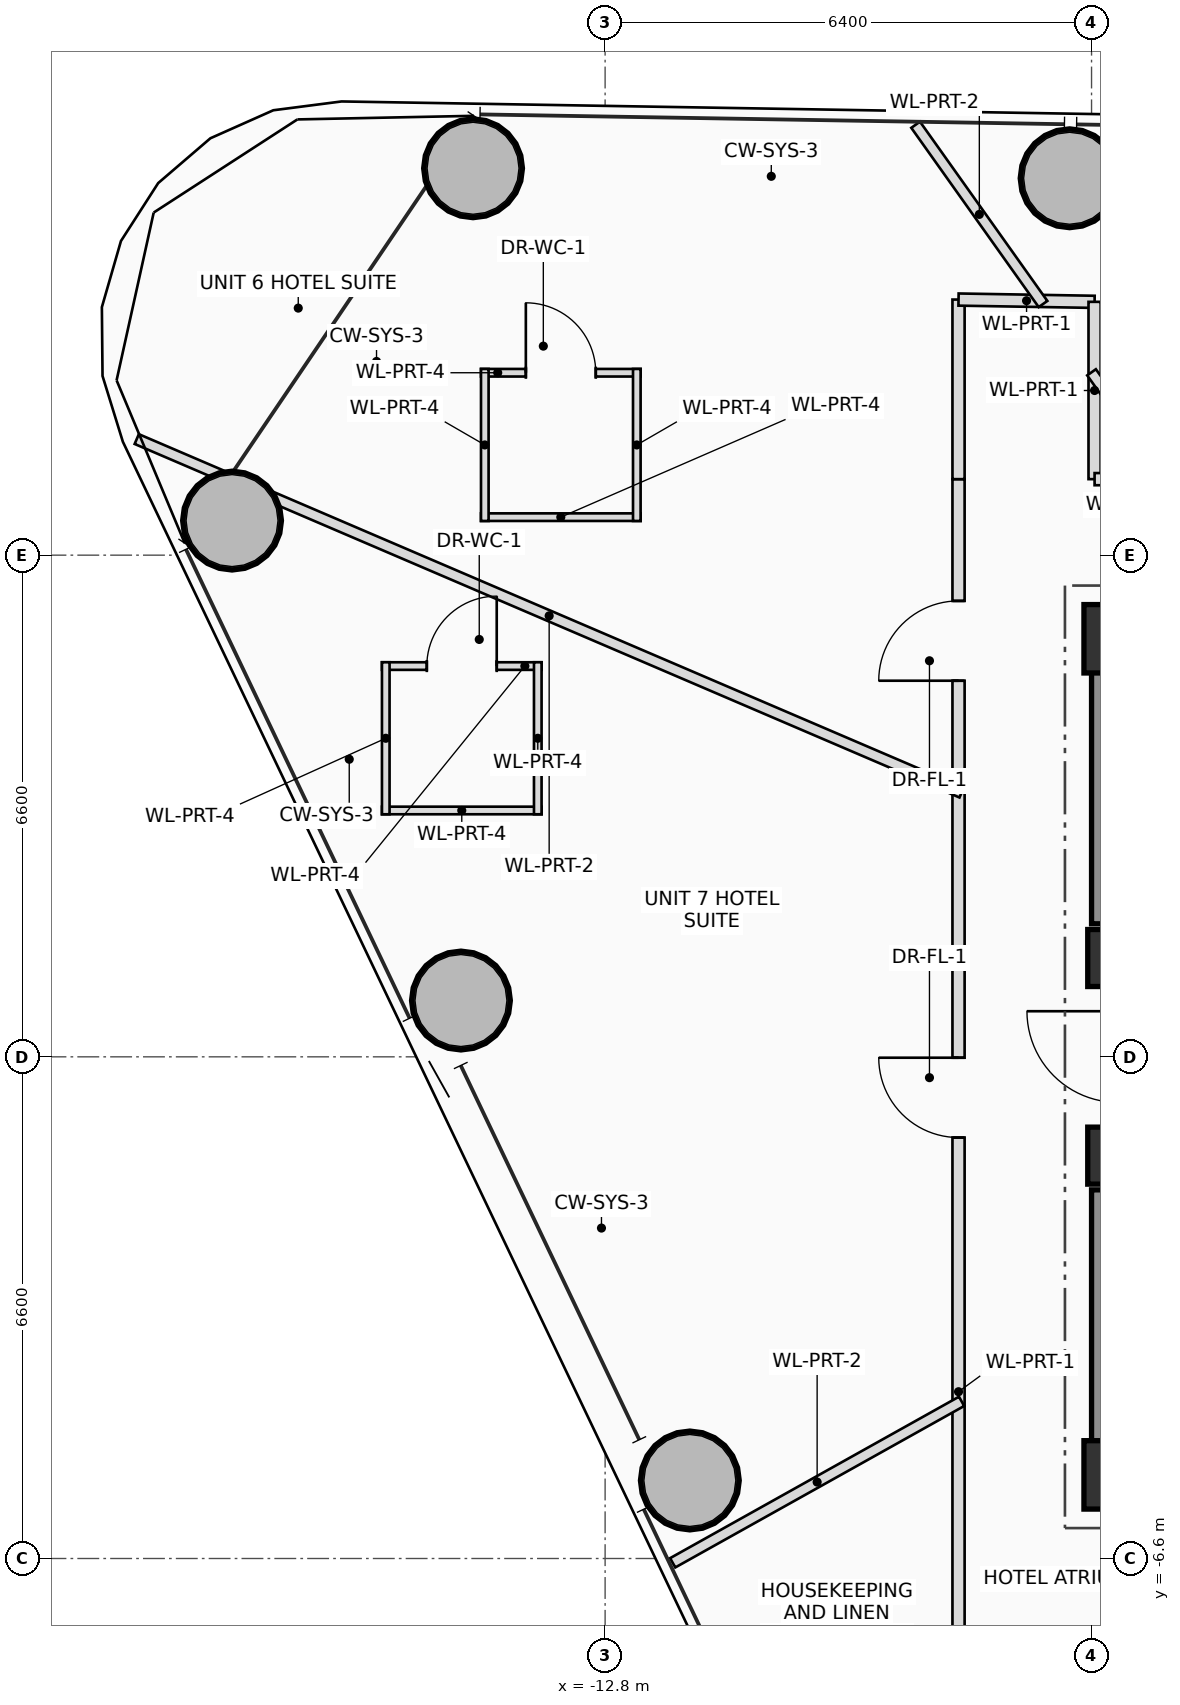
"""IFC4 building model, lengths in metres.
Left out: names, types, materials, properties, quantities, classifications, styles, units other than length and angle.
Written with IfcOpenShell. Run it as: python <this file> out.ifc"""

import sys

from ifc_helpers import new_model, si_unit, direction, frame, frame_2d, origin, origin_2d, place, context, subcontext, project, spatial, rectangle, hollow_circle, extrude, source, transform, mapped, element, fill, save


model = new_model("IFC4")
c1 = context("Model", 3, precision=1e-05, world=origin(), true_north=direction((0.0, 1.0)))
c2 = subcontext(c1, "Body", "Model", "MODEL_VIEW")
j1 = project(units=[si_unit("LENGTHUNIT", "METRE"), si_unit("PLANEANGLEUNIT", "RADIAN")], contexts=[c1])
p1 = place(None, origin())
s1 = spatial("IfcSite", under=j1, at=p1, CompositionType="ELEMENT")
p2 = place(p1, origin())
s2 = spatial("IfcBuilding", under=s1, at=p2, CompositionType="ELEMENT")
p3 = place(p2, frame((0.0, 0.0, 143.3)))
s3 = spatial("IfcBuildingStorey", under=s2, at=p3, CompositionType="ELEMENT", Elevation=143.3)
m1 = source(origin(), c2, "Body", "SweptSolid", [
    extrude(rectangle(XDim=0.9, YDim=0.9, at=origin_2d()), origin(), (0.0, 0.0, 1.0), 3.45),
])
for number, where, z_axis, x_axis in (
    (1, (-6.05, -5.5, 0.0), (0.0, 0.0, 1.0), (1.0, 0.0, 0.0)),
    (2, (-6.05, 5.5, 0.0), (0.0, 0.0, 1.0), (1.0, 0.0, 0.0)),
):
    element("IfcColumn", number, at=place(p3, frame(where, z_axis=z_axis, x_axis=x_axis)), inside=s3, PredefinedType="COLUMN", context=c2, shape_type="MappedRepresentation", body=[
        mapped(m1, transform((0.0, 0.0, 0.0), scale=1.0)),
    ])
p4 = place(p3, frame((-6.4, 5.525, 0.0), z_axis=(0.0, 0.0, 1.0), x_axis=(1.0, 0.0, 0.0)))
e3 = element("IfcWall", 3, at=p4, inside=s3, PredefinedType="SHEAR", context=c2, shape_type="SweptSolid", body=[
    extrude(rectangle(XDim=12.8, YDim=0.65, at=frame_2d((6.4, 0.0))), origin(), (0.0, 0.0, 1.0), 3.45),
])
p5 = place(p4, frame((8.6, 0.0, 0.0)))
e4 = element("IfcOpeningElement", 4, at=p5, cuts=e3, PredefinedType="OPENING", context=c2, shape_type="SweptSolid", body=[
    extrude(rectangle(XDim=1.2, YDim=2.2, at=frame_2d((0.6, 1.1))), frame((0.0, 0.335, 0.0), z_axis=(0.0, -1.0, 0.0), x_axis=(1.0, 0.0, 0.0)), (0.0, 0.0, 1.0), 0.67),
])
p6 = place(p3, frame((-6.4, -5.525, 0.0), z_axis=(0.0, 0.0, 1.0), x_axis=(1.0, 0.0, 0.0)))
e5 = element("IfcWall", 5, at=p6, inside=s3, PredefinedType="SHEAR", context=c2, shape_type="SweptSolid", body=[
    extrude(rectangle(XDim=12.8, YDim=0.65, at=frame_2d((6.4, 0.0))), origin(), (0.0, 0.0, 1.0), 3.45),
])
p7 = place(p6, frame((8.6, 0.0, 0.0)))
e6 = element("IfcOpeningElement", 6, at=p7, cuts=e5, PredefinedType="OPENING", context=c2, shape_type="SweptSolid", body=[
    extrude(rectangle(XDim=1.2, YDim=2.2, at=frame_2d((0.6, 1.1))), frame((0.0, 0.335, 0.0), z_axis=(0.0, -1.0, 0.0), x_axis=(1.0, 0.0, 0.0)), (0.0, 0.0, 1.0), 0.67),
])
for number, where, z_axis, x_axis in (
    (7, (-6.075, -5.2, 0.0), (0.0, 0.0, 1.0), (0.0, 1.0, 0.0)),
    (8, (-6.075, 1.75, 0.0), (0.0, 0.0, 1.0), (0.0, 1.0, 0.0)),
):
    element("IfcWall", number, at=place(p3, frame(where, z_axis=z_axis, x_axis=x_axis)), inside=s3, PredefinedType="SHEAR", context=c2, shape_type="SweptSolid", body=[
        extrude(rectangle(XDim=3.45, YDim=0.65, at=frame_2d((1.725, 0.0))), origin(), (0.0, 0.0, 1.0), 3.45),
    ])
m2 = source(origin(), c2, "Body", "SweptSolid", [
    extrude(rectangle(XDim=0.75, YDim=0.75, at=origin_2d()), origin(), (0.0, 0.0, 1.0), 3.45),
])
for number, where, z_axis, x_axis in (
    (9, (-6.075, -1.3, 0.0), (0.0, 0.0, 1.0), (1.0, 0.0, 0.0)),
    (10, (-6.075, 1.3, 0.0), (0.0, 0.0, 1.0), (1.0, 0.0, 0.0)),
):
    element("IfcColumn", number, at=place(p3, frame(where, z_axis=z_axis, x_axis=x_axis)), inside=s3, PredefinedType="COLUMN", context=c2, shape_type="MappedRepresentation", body=[
        mapped(m2, transform((0.0, 0.0, 0.0), scale=1.0)),
    ])
m3 = source(origin(), c2, "Body", "SweptSolid", [
    extrude(hollow_circle(Radius=0.65, WallThickness=0.045, at=origin_2d()), origin(), (0.0, 0.0, 1.0), 3.45),
])
for number, where, z_axis, x_axis in (
    (11, (-6.688, 11.558, 0.0), (0.0, 0.0, 1.0), (1.0, 0.0, 0.0)),
    (12, (-14.538, 11.69, 0.0), (0.0, 0.0, 1.0), (1.0, 0.0, 0.0)),
    (13, (-17.708, 7.055, 0.0), (0.0, 0.0, 1.0), (1.0, 0.0, 0.0)),
    (14, (-14.697, 0.74, 0.0), (0.0, 0.0, 1.0), (1.0, 0.0, 0.0)),
    (15, (-11.685, -5.573, 0.0), (0.0, 0.0, 1.0), (1.0, 0.0, 0.0)),
):
    element("IfcColumn", number, at=place(p3, frame(where, z_axis=z_axis, x_axis=x_axis)), inside=s3, PredefinedType="COLUMN", context=c2, shape_type="MappedRepresentation", body=[
        mapped(m3, transform((0.0, 0.0, 0.0), scale=1.0)),
    ])
p8 = place(p3, frame((-14.433, 9.0, 0.0), z_axis=(0.0, 0.0, 1.0), x_axis=(1.0, 0.0, 0.0)))
e16 = element("IfcWall", 16, at=p8, inside=s3, PredefinedType="PARTITIONING", context=c2, shape_type="SweptSolid", body=[
    extrude(rectangle(XDim=2.1, YDim=0.1, at=frame_2d((1.05, 0.0))), origin(), (0.0, 0.0, 1.0), 2.905),
])
p9 = place(p8, frame((0.59, 0.0, 0.0)))
e17 = element("IfcOpeningElement", 17, at=p9, cuts=e16, PredefinedType="OPENING", context=c2, shape_type="SweptSolid", body=[
    extrude(rectangle(XDim=0.92, YDim=2.1, at=frame_2d((0.46, 1.05))), frame((0.0, 0.06, 0.0), z_axis=(0.0, -1.0, 0.0), x_axis=(1.0, 0.0, 0.0)), (0.0, 0.0, 1.0), 0.12),
])
p10 = place(p3, frame((-12.333, 7.1, 0.0), z_axis=(0.0, 0.0, 1.0), x_axis=(-1.0, 0.0, 0.0)))
e18 = element("IfcWall", 18, at=p10, inside=s3, PredefinedType="PARTITIONING", context=c2, shape_type="SweptSolid", body=[
    extrude(rectangle(XDim=2.1, YDim=0.1, at=frame_2d((1.05, 0.0))), origin(), (0.0, 0.0, 1.0), 2.905),
])
p11 = place(p3, frame((-12.383, 9.05, 0.0), z_axis=(0.0, 0.0, 1.0), x_axis=(0.0, -1.0, 0.0)))
e19 = element("IfcWall", 19, at=p11, inside=s3, PredefinedType="PARTITIONING", context=c2, shape_type="SweptSolid", body=[
    extrude(rectangle(XDim=2.0, YDim=0.1, at=frame_2d((1.0, 0.0))), origin(), (0.0, 0.0, 1.0), 2.905),
])
p12 = place(p3, frame((-14.383, 7.05, 0.0), z_axis=(0.0, 0.0, 1.0), x_axis=(0.0, 1.0, 0.0)))
e20 = element("IfcWall", 20, at=p12, inside=s3, PredefinedType="PARTITIONING", context=c2, shape_type="SweptSolid", body=[
    extrude(rectangle(XDim=2.0, YDim=0.1, at=frame_2d((1.0, 0.0))), origin(), (0.0, 0.0, 1.0), 3.25),
])
p13 = place(p3, frame((-15.736, 5.141, 0.0), z_axis=(0.0, 0.0, 1.0), x_axis=(1.0, 0.0, 0.0)))
e21 = element("IfcWall", 21, at=p13, inside=s3, PredefinedType="PARTITIONING", context=c2, shape_type="SweptSolid", body=[
    extrude(rectangle(XDim=2.1, YDim=0.1, at=frame_2d((1.05, 0.0))), origin(), (0.0, 0.0, 1.0), 2.905),
])
p14 = place(p13, frame((0.59, 0.0, 0.0)))
e22 = element("IfcOpeningElement", 22, at=p14, cuts=e21, PredefinedType="OPENING", context=c2, shape_type="SweptSolid", body=[
    extrude(rectangle(XDim=0.92, YDim=2.1, at=frame_2d((0.46, 1.05))), frame((0.0, 0.06, 0.0), z_axis=(0.0, -1.0, 0.0), x_axis=(1.0, 0.0, 0.0)), (0.0, 0.0, 1.0), 0.12),
])
p15 = place(p3, frame((-13.636, 3.241, 0.0), z_axis=(0.0, 0.0, 1.0), x_axis=(-1.0, 0.0, 0.0)))
e23 = element("IfcWall", 23, at=p15, inside=s3, PredefinedType="PARTITIONING", context=c2, shape_type="SweptSolid", body=[
    extrude(rectangle(XDim=2.1, YDim=0.1, at=frame_2d((1.05, 0.0))), origin(), (0.0, 0.0, 1.0), 3.25),
])
p16 = place(p3, frame((-13.686, 5.191, 0.0), z_axis=(0.0, 0.0, 1.0), x_axis=(0.0, -1.0, 0.0)))
e24 = element("IfcWall", 24, at=p16, inside=s3, PredefinedType="PARTITIONING", context=c2, shape_type="SweptSolid", body=[
    extrude(rectangle(XDim=2.0, YDim=0.1, at=frame_2d((1.0, 0.0))), origin(), (0.0, 0.0, 1.0), 2.905),
])
p17 = place(p3, frame((-15.686, 3.191, 0.0), z_axis=(0.0, 0.0, 1.0), x_axis=(0.0, 1.0, 0.0)))
e25 = element("IfcWall", 25, at=p17, inside=s3, PredefinedType="PARTITIONING", context=c2, shape_type="SweptSolid", body=[
    extrude(rectangle(XDim=2.0, YDim=0.1, at=frame_2d((1.0, 0.0))), origin(), (0.0, 0.0, 1.0), 3.25),
])
p18 = place(p3, frame((-8.15, -7.6, 0.0), z_axis=(0.0, 0.0, 1.0), x_axis=(0.0, 1.0, 0.0)))
e26 = element("IfcWall", 26, at=p18, inside=s3, PredefinedType="PARTITIONING", context=c2, shape_type="SweptSolid", body=[
    extrude(rectangle(XDim=15.2, YDim=0.16, at=frame_2d((7.6, 0.0))), origin(), (0.0, 0.0, 1.0), 2.605),
])
p19 = place(p18, frame((6.538, 0.0, 0.0)))
e27 = element("IfcOpeningElement", 27, at=p19, cuts=e26, PredefinedType="OPENING", context=c2, shape_type="SweptSolid", body=[
    extrude(rectangle(XDim=1.05, YDim=2.2, at=frame_2d((0.525, 1.1))), frame((0.0, 0.09, 0.0), z_axis=(0.0, -1.0, 0.0), x_axis=(1.0, 0.0, 0.0)), (0.0, 0.0, 1.0), 0.18),
])
p20 = place(p18, frame((12.548, 0.0, 0.0)))
e28 = element("IfcOpeningElement", 28, at=p20, cuts=e26, PredefinedType="OPENING", context=c2, shape_type="SweptSolid", body=[
    extrude(rectangle(XDim=1.05, YDim=2.2, at=frame_2d((0.525, 1.1))), frame((0.0, 0.09, 0.0), z_axis=(0.0, -1.0, 0.0), x_axis=(1.0, 0.0, 0.0)), (0.0, 0.0, 1.0), 0.18),
])
p21 = place(p3, frame((-8.15, 7.6, 0.0), z_axis=(0.0, 0.0, 1.0), x_axis=(0.0, 1.0, 0.0)))
e29 = element("IfcWall", 29, at=p21, inside=s3, PredefinedType="PARTITIONING", context=c2, shape_type="SweptSolid", body=[
    extrude(rectangle(XDim=2.363, YDim=0.16, at=frame_2d((1.181, 0.0))), origin(), (0.0, 0.0, 1.0), 2.805),
])
p22 = place(p3, frame((-8.15, 9.963, 0.0), z_axis=(0.0, 0.0, 1.0), x_axis=(0.999859277964, -0.016775704705, 0.0)))
e30 = element("IfcWall", 30, at=p22, inside=s3, PredefinedType="PARTITIONING", context=c2, shape_type="SweptSolid", body=[
    extrude(rectangle(XDim=1.79, YDim=0.16, at=frame_2d((0.895, 0.0))), origin(), (0.0, 0.0, 1.0), 2.605),
])
p23 = place(p3, frame((-6.36, 9.933, 0.0), z_axis=(0.0, 0.0, 1.0), x_axis=(0.0, -1.0, 0.0)))
e31 = element("IfcWall", 31, at=p23, inside=s3, PredefinedType="PARTITIONING", context=c2, shape_type="SweptSolid", body=[
    extrude(rectangle(XDim=2.333, YDim=0.16, at=frame_2d((1.166, 0.0))), origin(), (0.0, 0.0, 1.0), 2.605),
])
p24 = place(p3, frame((-6.36, 7.6, 0.0), z_axis=(0.0, 0.0, 1.0), x_axis=(1.0, 0.0, 0.0)))
e32 = element("IfcWall", 32, at=p24, inside=s3, PredefinedType="PARTITIONING", context=c2, shape_type="SweptSolid", body=[
    extrude(rectangle(XDim=11.61, YDim=0.16, at=frame_2d((5.805, 0.0))), origin(), (0.0, 0.0, 1.0), 2.605),
])
p25 = place(p24, frame((4.501, 0.0, 0.0)))
e33 = element("IfcOpeningElement", 33, at=p25, cuts=e32, PredefinedType="OPENING", context=c2, shape_type="SweptSolid", body=[
    extrude(rectangle(XDim=1.05, YDim=2.2, at=frame_2d((0.525, 1.1))), frame((0.0, 0.09, 0.0), z_axis=(0.0, -1.0, 0.0), x_axis=(1.0, 0.0, 0.0)), (0.0, 0.0, 1.0), 0.18),
])
p26 = place(p24, frame((9.791, 0.0, 0.0)))
e34 = element("IfcOpeningElement", 34, at=p26, cuts=e32, PredefinedType="OPENING", context=c2, shape_type="SweptSolid", body=[
    extrude(rectangle(XDim=1.0, YDim=2.25, at=frame_2d((0.5, 1.125))), frame((0.0, 0.09, 0.0), z_axis=(0.0, -1.0, 0.0), x_axis=(1.0, 0.0, 0.0)), (0.0, 0.0, 1.0), 0.18),
])
p27 = place(p3, frame((-5.373, 7.56, 0.0), z_axis=(0.0, 0.0, 1.0), x_axis=(-0.579296202647, 0.815117114039, 0.0)))
e35 = element("IfcWall", 35, at=p27, inside=s3, PredefinedType="PARTITIONING", context=c2, shape_type="SweptSolid", body=[
    extrude(rectangle(XDim=1.773, YDim=0.14, at=frame_2d((0.887, 0.0))), origin(), (0.0, 0.0, 1.0), 2.605),
])
p28 = place(p3, frame((-7.038, 9.904, 0.0), z_axis=(0.0, 0.0, 1.0), x_axis=(-0.57933697246, 0.815088137775, 0.0)))
e36 = element("IfcWall", 36, at=p28, inside=s3, PredefinedType="PARTITIONING", context=c2, shape_type="SweptSolid", body=[
    extrude(rectangle(XDim=2.893, YDim=0.14, at=frame_2d((1.447, 0.0))), origin(), (0.0, 0.0, 1.0), 2.765),
])
p29 = place(p3, frame((-8.11, 3.476, 0.0), z_axis=(0.0, 0.0, 1.0), x_axis=(-0.919140751836, 0.393929280854, 0.0)))
e37 = element("IfcWall", 37, at=p29, inside=s3, PredefinedType="PARTITIONING", context=c2, shape_type="SweptSolid", body=[
    extrude(rectangle(XDim=11.807, YDim=0.14, at=frame_2d((5.903, 0.0))), origin(), (0.0, 0.0, 1.0), 2.605),
])
p30 = place(p3, frame((-8.11, -4.532, 0.0), z_axis=(0.0, 0.0, 1.0), x_axis=(-0.87291398503, -0.487874138216, 0.0)))
e38 = element("IfcWall", 38, at=p30, inside=s3, PredefinedType="PARTITIONING", context=c2, shape_type="SweptSolid", body=[
    extrude(rectangle(XDim=4.354, YDim=0.14, at=frame_2d((2.177, 0.0))), origin(), (0.0, 0.0, 1.0), 2.605),
])
p31 = place(p9, origin())
e39 = element("IfcDoor", 39, at=p31, inside=s3, OperationType="SINGLE_SWING_LEFT", PredefinedType="DOOR", context=c2, shape_type="SweptSolid", body=[
    extrude(rectangle(XDim=0.92, YDim=2.1, at=frame_2d((0.46, 1.05))), frame((0.0, 0.025, 0.0), z_axis=(0.0, -1.0, 0.0), x_axis=(1.0, 0.0, 0.0)), (0.0, 0.0, 1.0), 0.05),
])
fill(e17, e39)
p32 = place(p14, origin())
e40 = element("IfcDoor", 40, at=p32, inside=s3, OperationType="SINGLE_SWING_RIGHT", PredefinedType="DOOR", context=c2, shape_type="SweptSolid", body=[
    extrude(rectangle(XDim=0.92, YDim=2.1, at=frame_2d((0.46, 1.05))), frame((0.0, 0.025, 0.0), z_axis=(0.0, -1.0, 0.0), x_axis=(1.0, 0.0, 0.0)), (0.0, 0.0, 1.0), 0.05),
])
fill(e22, e40)
p33 = place(p19, origin())
e41 = element("IfcDoor", 41, at=p33, inside=s3, OperationType="SINGLE_SWING_RIGHT", PredefinedType="DOOR", context=c2, shape_type="SweptSolid", body=[
    extrude(rectangle(XDim=1.05, YDim=2.2, at=frame_2d((0.525, 1.1))), frame((0.0, 0.025, 0.0), z_axis=(0.0, -1.0, 0.0), x_axis=(1.0, 0.0, 0.0)), (0.0, 0.0, 1.0), 0.05),
])
fill(e27, e41)
p34 = place(p20, origin())
e42 = element("IfcDoor", 42, at=p34, inside=s3, OperationType="SINGLE_SWING_LEFT", PredefinedType="DOOR", context=c2, shape_type="SweptSolid", body=[
    extrude(rectangle(XDim=1.05, YDim=2.2, at=frame_2d((0.525, 1.1))), frame((0.0, 0.025, 0.0), z_axis=(0.0, -1.0, 0.0), x_axis=(1.0, 0.0, 0.0)), (0.0, 0.0, 1.0), 0.05),
])
fill(e28, e42)
save(model, sys.argv[1])
